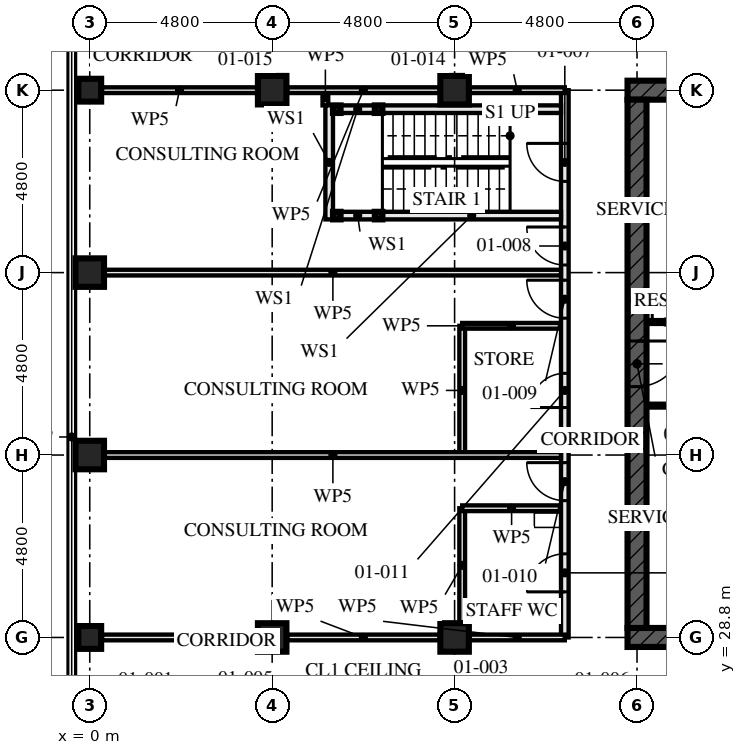
"""IFC4 building model, lengths in metres.
Left out: names, types, materials, properties, quantities, classifications, styles, units other than length and angle.
Written with IfcOpenShell. Run it as: python <this file> out.ifc"""

import sys

from ifc_helpers import new_model, si_unit, direction, frame, frame_2d, origin, origin_2d, place, context, subcontext, project, spatial, rectangle, hollow_rectangle, extrude, element, fill, save


model = new_model("IFC4")
c1 = context("Model", 3, precision=1e-05, world=origin(), true_north=direction((0.0, 1.0)))
c2 = subcontext(c1, "Body", "Model", "MODEL_VIEW")
j1 = project(units=[si_unit("LENGTHUNIT", "METRE"), si_unit("PLANEANGLEUNIT", "RADIAN")], contexts=[c1])
p1 = place(None, origin())
s1 = spatial("IfcSite", under=j1, at=p1, CompositionType="ELEMENT")
p2 = place(p1, origin())
s2 = spatial("IfcBuilding", under=s1, at=p2, CompositionType="ELEMENT")
p3 = place(p2, frame((0.0, 0.0, 4.5)))
s3 = spatial("IfcBuildingStorey", under=s2, at=p3, CompositionType="ELEMENT", Elevation=4.5)
p4 = place(p3, frame((0.0, 28.8, 0.0), z_axis=(0.0, 0.0, 1.0), x_axis=(0.0, 1.0, 0.0)))
e1 = element("IfcColumn", 1, at=p4, inside=s3, PredefinedType="COLUMN", context=c2, shape_type="SweptSolid", body=[
    extrude(hollow_rectangle(XDim=0.6, YDim=0.6, WallThickness=0.08, at=origin_2d()), origin(), (0.0, 0.0, 1.0), 4.5),
])
for number, where, z_axis, x_axis in (
    (2, (0.0, 33.6, 0.0), (0.0, 0.0, 1.0), (1.0, 0.0, 0.0)),
    (3, (0.0, 38.4, 0.0), (0.0, 0.0, 1.0), (1.0, 0.0, 0.0)),
):
    element("IfcColumn", number, at=place(p3, frame(where, z_axis=z_axis, x_axis=x_axis)), inside=s3, PredefinedType="COLUMN", context=c2, shape_type="SweptSolid", body=[
        extrude(hollow_rectangle(XDim=0.75, YDim=0.75, WallThickness=0.08, at=origin_2d()), origin(), (0.0, 0.0, 1.0), 4.5),
    ])
p5 = place(p3, frame((0.0, 43.2, 0.0), z_axis=(0.0, 0.0, 1.0), x_axis=(0.0, 1.0, 0.0)))
e4 = element("IfcColumn", 4, at=p5, inside=s3, PredefinedType="COLUMN", context=c2, shape_type="SweptSolid", body=[
    extrude(hollow_rectangle(XDim=0.6, YDim=0.6, WallThickness=0.08, at=origin_2d()), origin(), (0.0, 0.0, 1.0), 4.5),
])
for number, where, z_axis, x_axis in (
    (5, (4.8, 28.8, 0.0), (0.0, 0.0, 1.0), (0.0, 1.0, 0.0)),
    (6, (4.8, 43.2, 0.0), (0.0, 0.0, 1.0), (0.0, 1.0, 0.0)),
    (7, (9.6, 28.8, 0.0), (0.0, 0.0, 1.0), (0.0, 1.0, 0.0)),
    (8, (9.6, 43.2, 0.0), (0.0, 0.0, 1.0), (0.0, 1.0, 0.0)),
):
    element("IfcColumn", number, at=place(p3, frame(where, z_axis=z_axis, x_axis=x_axis)), inside=s3, PredefinedType="COLUMN", context=c2, shape_type="SweptSolid", body=[
        extrude(hollow_rectangle(XDim=0.75, YDim=0.75, WallThickness=0.08, at=origin_2d()), origin(), (0.0, 0.0, 1.0), 4.5),
    ])
p6 = place(p3, frame((14.15, 28.8, -0.17), z_axis=(0.0, 0.0, 1.0), x_axis=(1.0, 0.0, 0.0)))
e9 = element("IfcWall", 9, at=p6, inside=s3, PredefinedType="SHEAR", context=c2, shape_type="SweptSolid", body=[
    extrude(rectangle(XDim=14.9, YDim=0.5, at=frame_2d((7.45, 0.0))), origin(), (0.0, 0.0, 1.0), 4.5),
])
p7 = place(p6, frame((6.85, 0.0, 0.17)))
e10 = element("IfcOpeningElement", 10, at=p7, cuts=e9, PredefinedType="OPENING", context=c2, shape_type="SweptSolid", body=[
    extrude(rectangle(XDim=1.2, YDim=2.1, at=frame_2d((0.6, 1.05))), frame((0.0, 0.26, 0.0), z_axis=(0.0, -1.0, 0.0), x_axis=(1.0, 0.0, 0.0)), (0.0, 0.0, 1.0), 0.521),
])
p8 = place(p3, frame((29.05, 43.2, -0.17), z_axis=(0.0, 0.0, 1.0), x_axis=(-1.0, 0.0, 0.0)))
e11 = element("IfcWall", 11, at=p8, inside=s3, PredefinedType="SHEAR", context=c2, shape_type="SweptSolid", body=[
    extrude(rectangle(XDim=14.9, YDim=0.5, at=frame_2d((7.45, 0.0))), origin(), (0.0, 0.0, 1.0), 4.5),
])
p9 = place(p8, frame((6.85, 0.0, 0.17)))
e12 = element("IfcOpeningElement", 12, at=p9, cuts=e11, PredefinedType="OPENING", context=c2, shape_type="SweptSolid", body=[
    extrude(rectangle(XDim=1.2, YDim=2.1, at=frame_2d((0.6, 1.05))), frame((0.0, 0.26, 0.0), z_axis=(0.0, -1.0, 0.0), x_axis=(1.0, 0.0, 0.0)), (0.0, 0.0, 1.0), 0.521),
])
p10 = place(p3, frame((14.4, 42.95, -0.17), z_axis=(0.0, 0.0, 1.0), x_axis=(0.0, -1.0, 0.0)))
e13 = element("IfcWall", 13, at=p10, inside=s3, PredefinedType="SHEAR", context=c2, shape_type="SweptSolid", body=[
    extrude(rectangle(XDim=13.9, YDim=0.5, at=frame_2d((6.95, 0.0))), origin(), (0.0, 0.0, 1.0), 4.5),
])
p11 = place(p10, frame((6.35, 0.0, 0.17)))
e14 = element("IfcOpeningElement", 14, at=p11, cuts=e13, PredefinedType="OPENING", context=c2, shape_type="SweptSolid", body=[
    extrude(rectangle(XDim=1.2, YDim=2.1, at=frame_2d((0.6, 1.05))), frame((0.0, 0.26, 0.0), z_axis=(0.0, -1.0, 0.0), x_axis=(1.0, 0.0, 0.0)), (0.0, 0.0, 1.0), 0.521),
])
for number, where, z_axis, x_axis in (
    (15, (6.5, 42.7, 0.0), (0.0, 0.0, 1.0), (1.0, 0.0, 0.0)),
    (16, (6.5, 39.9, 0.0), (0.0, 0.0, 1.0), (1.0, 0.0, 0.0)),
    (17, (7.6, 42.7, 0.0), (0.0, 0.0, 1.0), (1.0, 0.0, 0.0)),
    (18, (7.6, 39.9, 0.0), (0.0, 0.0, 1.0), (1.0, 0.0, 0.0)),
):
    element("IfcColumn", number, at=place(p3, frame(where, z_axis=z_axis, x_axis=x_axis)), inside=s3, PredefinedType="COLUMN", context=c2, shape_type="SweptSolid", body=[
        extrude(hollow_rectangle(XDim=0.2, YDim=0.2, WallThickness=0.008, at=origin_2d()), origin(), (0.0, 0.0, 1.0), 4.33),
    ])
p12 = place(p3, frame((6.6, 42.7, 0.0), z_axis=(0.0, 0.0, 1.0), x_axis=(1.0, 0.0, 0.0)))
e19 = element("IfcWall", 19, at=p12, inside=s3, PredefinedType="SOLIDWALL", context=c2, shape_type="SweptSolid", body=[
    extrude(rectangle(XDim=0.9, YDim=0.2, at=frame_2d((0.45, 0.0))), origin(), (0.0, 0.0, 1.0), 3.99),
])
p13 = place(p3, frame((7.7, 42.7, 0.0), z_axis=(0.0, 0.0, 1.0), x_axis=(1.0, 0.0, 0.0)))
e20 = element("IfcWall", 20, at=p13, inside=s3, PredefinedType="SOLIDWALL", context=c2, shape_type="SweptSolid", body=[
    extrude(rectangle(XDim=4.7, YDim=0.2, at=frame_2d((2.35, 0.0))), origin(), (0.0, 0.0, 1.0), 3.99),
])
p14 = place(p3, frame((6.6, 39.9, 0.0), z_axis=(0.0, 0.0, 1.0), x_axis=(1.0, 0.0, 0.0)))
e21 = element("IfcWall", 21, at=p14, inside=s3, PredefinedType="SOLIDWALL", context=c2, shape_type="SweptSolid", body=[
    extrude(rectangle(XDim=0.9, YDim=0.2, at=frame_2d((0.45, 0.0))), origin(), (0.0, 0.0, 1.0), 3.99),
])
p15 = place(p3, frame((7.7, 39.9, 0.0), z_axis=(0.0, 0.0, 1.0), x_axis=(1.0, 0.0, 0.0)))
e22 = element("IfcWall", 22, at=p15, inside=s3, PredefinedType="SOLIDWALL", context=c2, shape_type="SweptSolid", body=[
    extrude(rectangle(XDim=4.7, YDim=0.2, at=frame_2d((2.35, 0.0))), origin(), (0.0, 0.0, 1.0), 3.99),
])
p16 = place(p3, frame((6.3, 42.8, 0.0), z_axis=(0.0, 0.0, 1.0), x_axis=(0.0, -1.0, 0.0)))
e23 = element("IfcWall", 23, at=p16, inside=s3, PredefinedType="SOLIDWALL", context=c2, shape_type="SweptSolid", body=[
    extrude(rectangle(XDim=3.0, YDim=0.2, at=frame_2d((1.5, 0.0))), origin(), (0.0, 0.0, 1.0), 4.33),
])
p17 = place(p3, frame((9.8, 37.0, 0.0), z_axis=(0.0, 0.0, 1.0), x_axis=(1.0, 0.0, 0.0)))
e24 = element("IfcWall", 24, at=p17, inside=s3, PredefinedType="PARTITIONING", context=c2, shape_type="SweptSolid", body=[
    extrude(rectangle(XDim=2.6, YDim=0.15, at=frame_2d((1.3, 0.0))), origin(), (0.0, 0.0, 1.0), 4.33),
])
p18 = place(p3, frame((9.8, 37.0, 0.0), z_axis=(0.0, 0.0, 1.0), x_axis=(0.0, -1.0, 0.0)))
e25 = element("IfcWall", 25, at=p18, inside=s3, PredefinedType="PARTITIONING", context=c2, shape_type="SweptSolid", body=[
    extrude(rectangle(XDim=3.4, YDim=0.15, at=frame_2d((1.7, 0.0))), origin(), (0.0, 0.0, 1.0), 4.33),
])
p19 = place(p3, frame((9.8, 32.2, 0.0), z_axis=(0.0, 0.0, 1.0), x_axis=(1.0, 0.0, 0.0)))
e26 = element("IfcWall", 26, at=p19, inside=s3, PredefinedType="PARTITIONING", context=c2, shape_type="SweptSolid", body=[
    extrude(rectangle(XDim=2.6, YDim=0.15, at=frame_2d((1.3, 0.0))), origin(), (0.0, 0.0, 1.0), 4.33),
])
p20 = place(p3, frame((9.8, 32.2, 0.0), z_axis=(0.0, 0.0, 1.0), x_axis=(0.0, -1.0, 0.0)))
e27 = element("IfcWall", 27, at=p20, inside=s3, PredefinedType="PARTITIONING", context=c2, shape_type="SweptSolid", body=[
    extrude(rectangle(XDim=3.005, YDim=0.15, at=frame_2d((1.502, 0.0))), origin(), (0.0, 0.0, 1.0), 4.33),
])
for number, where, z_axis, x_axis in (
    (28, (0.395, 38.4, 0.0), (0.0, 0.0, 1.0), (1.0, 0.0, 0.0)),
    (29, (0.395, 33.6, 0.0), (0.0, 0.0, 1.0), (1.0, 0.0, 0.0)),
):
    element("IfcWall", number, at=place(p3, frame(where, z_axis=z_axis, x_axis=x_axis)), inside=s3, PredefinedType="PARTITIONING", context=c2, shape_type="SweptSolid", body=[
        extrude(rectangle(XDim=12.005, YDim=0.15, at=frame_2d((6.002, 0.0))), origin(), (0.0, 0.0, 1.0), 3.55),
    ])
p21 = place(p3, frame((6.2, 43.2, 0.0), z_axis=(0.0, 0.0, 1.0), x_axis=(0.0, -1.0, 0.0)))
e30 = element("IfcWall", 30, at=p21, inside=s3, PredefinedType="PARTITIONING", context=c2, shape_type="SweptSolid", body=[
    extrude(rectangle(XDim=0.4, YDim=0.15, at=frame_2d((0.2, 0.0))), origin(), (0.0, 0.0, 1.0), 4.33),
])
p22 = place(p3, frame((12.5, 43.2, 0.0), z_axis=(0.0, 0.0, 1.0), x_axis=(0.0, -1.0, 0.0)))
e31 = element("IfcWall", 31, at=p22, inside=s3, PredefinedType="PARTITIONING", context=c2, shape_type="SweptSolid", body=[
    extrude(rectangle(XDim=14.4, YDim=0.2, at=frame_2d((7.2, 0.0))), origin(), (0.0, 0.0, 1.0), 3.55),
])
p23 = place(p22, frame((1.4, 0.0, 0.0)))
e32 = element("IfcOpeningElement", 32, at=p23, cuts=e31, PredefinedType="OPENING", context=c2, shape_type="SweptSolid", body=[
    extrude(rectangle(XDim=1.0, YDim=2.1, at=frame_2d((0.5, 1.05))), frame((0.0, 0.111, 0.0), z_axis=(0.0, -1.0, 0.0), x_axis=(1.0, 0.0, 0.0)), (0.0, 0.0, 1.0), 0.221),
])
p24 = place(p22, frame((3.6, 0.0, 0.0)))
e33 = element("IfcOpeningElement", 33, at=p24, cuts=e31, PredefinedType="OPENING", context=c2, shape_type="SweptSolid", body=[
    extrude(rectangle(XDim=1.0, YDim=2.4, at=frame_2d((0.5, 1.2))), frame((0.0, 0.111, 0.0), z_axis=(0.0, -1.0, 0.0), x_axis=(1.0, 0.0, 0.0)), (0.0, 0.0, 1.0), 0.221),
])
p25 = place(p22, frame((5.0, 0.0, 0.0)))
e34 = element("IfcOpeningElement", 34, at=p25, cuts=e31, PredefinedType="OPENING", context=c2, shape_type="SweptSolid", body=[
    extrude(rectangle(XDim=1.0, YDim=2.4, at=frame_2d((0.5, 1.2))), frame((0.0, 0.111, 0.0), z_axis=(0.0, -1.0, 0.0), x_axis=(1.0, 0.0, 0.0)), (0.0, 0.0, 1.0), 0.221),
])
p26 = place(p22, frame((9.8, 0.0, 0.0)))
e35 = element("IfcOpeningElement", 35, at=p26, cuts=e31, PredefinedType="OPENING", context=c2, shape_type="SweptSolid", body=[
    extrude(rectangle(XDim=1.0, YDim=2.4, at=frame_2d((0.5, 1.2))), frame((0.0, 0.111, 0.0), z_axis=(0.0, -1.0, 0.0), x_axis=(1.0, 0.0, 0.0)), (0.0, 0.0, 1.0), 0.221),
])
p27 = place(p22, frame((7.45, 0.0, 0.0)))
e36 = element("IfcOpeningElement", 36, at=p27, cuts=e31, PredefinedType="OPENING", context=c2, shape_type="SweptSolid", body=[
    extrude(rectangle(XDim=0.9, YDim=2.1, at=frame_2d((0.45, 1.05))), frame((0.0, 0.111, 0.0), z_axis=(0.0, -1.0, 0.0), x_axis=(1.0, 0.0, 0.0)), (0.0, 0.0, 1.0), 0.221),
])
p28 = place(p22, frame((12.2, 0.0, 0.0)))
e37 = element("IfcOpeningElement", 37, at=p28, cuts=e31, PredefinedType="OPENING", context=c2, shape_type="SweptSolid", body=[
    extrude(rectangle(XDim=1.0, YDim=2.1, at=frame_2d((0.5, 1.05))), frame((0.0, 0.111, 0.0), z_axis=(0.0, -1.0, 0.0), x_axis=(1.0, 0.0, 0.0)), (0.0, 0.0, 1.0), 0.221),
])
p29 = place(p3, frame((14.65, 34.9, 0.0), z_axis=(0.0, 0.0, 1.0), x_axis=(1.0, 0.0, 0.0)))
e38 = element("IfcWall", 38, at=p29, inside=s3, PredefinedType="SOLIDWALL", context=c2, shape_type="SweptSolid", body=[
    extrude(rectangle(XDim=5.9, YDim=0.1, at=frame_2d((2.95, 0.0))), origin(), (0.0, 0.0, 1.0), 4.33),
])
p30 = place(p29, frame((1.6, 0.0, 0.0)))
e39 = element("IfcOpeningElement", 39, at=p30, cuts=e38, PredefinedType="OPENING", context=c2, shape_type="SweptSolid", body=[
    extrude(rectangle(XDim=0.7, YDim=2.1, at=frame_2d((0.35, 1.05))), frame((0.0, 0.061, 0.0), z_axis=(0.0, -1.0, 0.0), x_axis=(1.0, 0.0, 0.0)), (0.0, 0.0, 1.0), 0.121),
])
p31 = place(p3, frame((14.65, 37.1, 0.0), z_axis=(0.0, 0.0, 1.0), x_axis=(1.0, 0.0, 0.0)))
e40 = element("IfcWall", 40, at=p31, inside=s3, PredefinedType="SOLIDWALL", context=c2, shape_type="SweptSolid", body=[
    extrude(rectangle(XDim=5.9, YDim=0.1, at=frame_2d((2.95, 0.0))), origin(), (0.0, 0.0, 1.0), 4.33),
])
p32 = place(p31, frame((0.15, 0.0, 0.0)))
e41 = element("IfcOpeningElement", 41, at=p32, cuts=e40, PredefinedType="OPENING", context=c2, shape_type="SweptSolid", body=[
    extrude(rectangle(XDim=0.7, YDim=2.1, at=frame_2d((0.35, 1.05))), frame((0.0, 0.061, 0.0), z_axis=(0.0, -1.0, 0.0), x_axis=(1.0, 0.0, 0.0)), (0.0, 0.0, 1.0), 0.121),
])
p33 = place(p31, frame((1.5, 0.0, 0.0)))
e42 = element("IfcOpeningElement", 42, at=p33, cuts=e40, PredefinedType="OPENING", context=c2, shape_type="SweptSolid", body=[
    extrude(rectangle(XDim=0.9, YDim=2.1, at=frame_2d((0.45, 1.05))), frame((0.0, 0.061, 0.0), z_axis=(0.0, -1.0, 0.0), x_axis=(1.0, 0.0, 0.0)), (0.0, 0.0, 1.0), 0.121),
])
p34 = place(p3, frame((12.5, 28.8, 0.0), z_axis=(0.0, 0.0, 1.0), x_axis=(-1.0, 0.0, 0.0)))
e43 = element("IfcWall", 43, at=p34, inside=s3, PredefinedType="PARTITIONING", context=c2, shape_type="SweptSolid", body=[
    extrude(rectangle(XDim=2.505, YDim=0.15, at=frame_2d((1.252, 0.0))), origin(), (0.0, 0.0, 1.0), 3.32),
])
p35 = place(p3, frame((9.205, 28.8, 0.0), z_axis=(0.0, 0.0, 1.0), x_axis=(-1.0, 0.0, 0.0)))
e44 = element("IfcWall", 44, at=p35, inside=s3, PredefinedType="PARTITIONING", context=c2, shape_type="SweptSolid", body=[
    extrude(rectangle(XDim=4.01, YDim=0.15, at=frame_2d((2.005, 0.0))), origin(), (0.0, 0.0, 1.0), 3.32),
])
p36 = place(p3, frame((4.405, 28.8, 0.0), z_axis=(0.0, 0.0, 1.0), x_axis=(-1.0, 0.0, 0.0)))
e45 = element("IfcWall", 45, at=p36, inside=s3, PredefinedType="PARTITIONING", context=c2, shape_type="SweptSolid", body=[
    extrude(rectangle(XDim=4.085, YDim=0.15, at=frame_2d((2.042, 0.0))), origin(), (0.0, 0.0, 1.0), 3.32),
])
p37 = place(p3, frame((12.5, 43.2, 0.0), z_axis=(0.0, 0.0, 1.0), x_axis=(-1.0, 0.0, 0.0)))
e46 = element("IfcWall", 46, at=p37, inside=s3, PredefinedType="PARTITIONING", context=c2, shape_type="SweptSolid", body=[
    extrude(rectangle(XDim=2.505, YDim=0.15, at=frame_2d((1.252, 0.0))), origin(), (0.0, 0.0, 1.0), 3.32),
])
p38 = place(p3, frame((9.205, 43.2, 0.0), z_axis=(0.0, 0.0, 1.0), x_axis=(-1.0, 0.0, 0.0)))
e47 = element("IfcWall", 47, at=p38, inside=s3, PredefinedType="PARTITIONING", context=c2, shape_type="SweptSolid", body=[
    extrude(rectangle(XDim=4.01, YDim=0.15, at=frame_2d((2.005, 0.0))), origin(), (0.0, 0.0, 1.0), 3.32),
])
p39 = place(p3, frame((4.405, 43.2, 0.0), z_axis=(0.0, 0.0, 1.0), x_axis=(-1.0, 0.0, 0.0)))
e48 = element("IfcWall", 48, at=p39, inside=s3, PredefinedType="PARTITIONING", context=c2, shape_type="SweptSolid", body=[
    extrude(rectangle(XDim=4.085, YDim=0.15, at=frame_2d((2.042, 0.0))), origin(), (0.0, 0.0, 1.0), 3.32),
])
p40 = place(p23, frame((1.0, 0.0, 0.0), z_axis=(0.0, 0.0, 1.0), x_axis=(-1.0, 0.0, 0.0)))
e49 = element("IfcDoor", 49, at=p40, inside=s3, OperationType="SINGLE_SWING_LEFT", PredefinedType="DOOR", context=c2, shape_type="SweptSolid", body=[
    extrude(rectangle(XDim=1.0, YDim=2.1, at=frame_2d((0.5, 1.05))), frame((0.0, 0.032, 0.0), z_axis=(0.0, -1.0, 0.0), x_axis=(1.0, 0.0, 0.0)), (0.0, 0.0, 1.0), 0.064),
])
fill(e32, e49)
p41 = place(p24, frame((1.0, 0.0, 0.0), z_axis=(0.0, 0.0, 1.0), x_axis=(-1.0, 0.0, 0.0)))
e50 = element("IfcDoor", 50, at=p41, inside=s3, OperationType="SINGLE_SWING_LEFT", PredefinedType="DOOR", context=c2, shape_type="SweptSolid", body=[
    extrude(rectangle(XDim=1.0, YDim=2.4, at=frame_2d((0.5, 1.2))), frame((0.0, 0.027, 0.0), z_axis=(0.0, -1.0, 0.0), x_axis=(1.0, 0.0, 0.0)), (0.0, 0.0, 1.0), 0.054),
])
fill(e33, e50)
p42 = place(p25, frame((1.0, 0.0, 0.0), z_axis=(0.0, 0.0, 1.0), x_axis=(-1.0, 0.0, 0.0)))
e51 = element("IfcDoor", 51, at=p42, inside=s3, OperationType="SINGLE_SWING_LEFT", PredefinedType="DOOR", context=c2, shape_type="SweptSolid", body=[
    extrude(rectangle(XDim=1.0, YDim=2.4, at=frame_2d((0.5, 1.2))), frame((0.0, 0.027, 0.0), z_axis=(0.0, -1.0, 0.0), x_axis=(1.0, 0.0, 0.0)), (0.0, 0.0, 1.0), 0.054),
])
fill(e34, e51)
p43 = place(p26, frame((1.0, 0.0, 0.0), z_axis=(0.0, 0.0, 1.0), x_axis=(-1.0, 0.0, 0.0)))
e52 = element("IfcDoor", 52, at=p43, inside=s3, OperationType="SINGLE_SWING_LEFT", PredefinedType="DOOR", context=c2, shape_type="SweptSolid", body=[
    extrude(rectangle(XDim=1.0, YDim=2.4, at=frame_2d((0.5, 1.2))), frame((0.0, 0.027, 0.0), z_axis=(0.0, -1.0, 0.0), x_axis=(1.0, 0.0, 0.0)), (0.0, 0.0, 1.0), 0.054),
])
fill(e35, e52)
p44 = place(p27, frame((0.9, 0.0, 0.0), z_axis=(0.0, 0.0, 1.0), x_axis=(-1.0, 0.0, 0.0)))
e53 = element("IfcDoor", 53, at=p44, inside=s3, OperationType="SINGLE_SWING_RIGHT", PredefinedType="DOOR", context=c2, shape_type="SweptSolid", body=[
    extrude(rectangle(XDim=0.9, YDim=2.1, at=frame_2d((0.45, 1.05))), frame((0.0, 0.027, 0.0), z_axis=(0.0, -1.0, 0.0), x_axis=(1.0, 0.0, 0.0)), (0.0, 0.0, 1.0), 0.054),
])
fill(e36, e53)
p45 = place(p28, frame((1.0, 0.0, 0.0), z_axis=(0.0, 0.0, 1.0), x_axis=(-1.0, 0.0, 0.0)))
e54 = element("IfcDoor", 54, at=p45, inside=s3, OperationType="SINGLE_SWING_RIGHT", PredefinedType="DOOR", context=c2, shape_type="SweptSolid", body=[
    extrude(rectangle(XDim=1.0, YDim=2.1, at=frame_2d((0.5, 1.05))), frame((0.0, 0.027, 0.0), z_axis=(0.0, -1.0, 0.0), x_axis=(1.0, 0.0, 0.0)), (0.0, 0.0, 1.0), 0.054),
])
fill(e37, e54)
p46 = place(p32, origin())
e55 = element("IfcDoor", 55, at=p46, inside=s3, OperationType="SINGLE_SWING_RIGHT", PredefinedType="DOOR", context=c2, shape_type="SweptSolid", body=[
    extrude(rectangle(XDim=0.7, YDim=2.1, at=frame_2d((0.35, 1.05))), frame((0.0, 0.027, 0.0), z_axis=(0.0, -1.0, 0.0), x_axis=(1.0, 0.0, 0.0)), (0.0, 0.0, 1.0), 0.054),
])
fill(e41, e55)
p47 = place(p11, origin())
e56 = element("IfcDoor", 56, at=p47, inside=s3, OperationType="SINGLE_SWING_LEFT", PredefinedType="DOOR", context=c2, shape_type="SweptSolid", body=[
    extrude(rectangle(XDim=1.2, YDim=2.1, at=frame_2d((0.6, 1.05))), frame((0.0, 0.027, 0.0), z_axis=(0.0, -1.0, 0.0), x_axis=(1.0, 0.0, 0.0)), (0.0, 0.0, 1.0), 0.054),
])
fill(e14, e56)
save(model, sys.argv[1])
